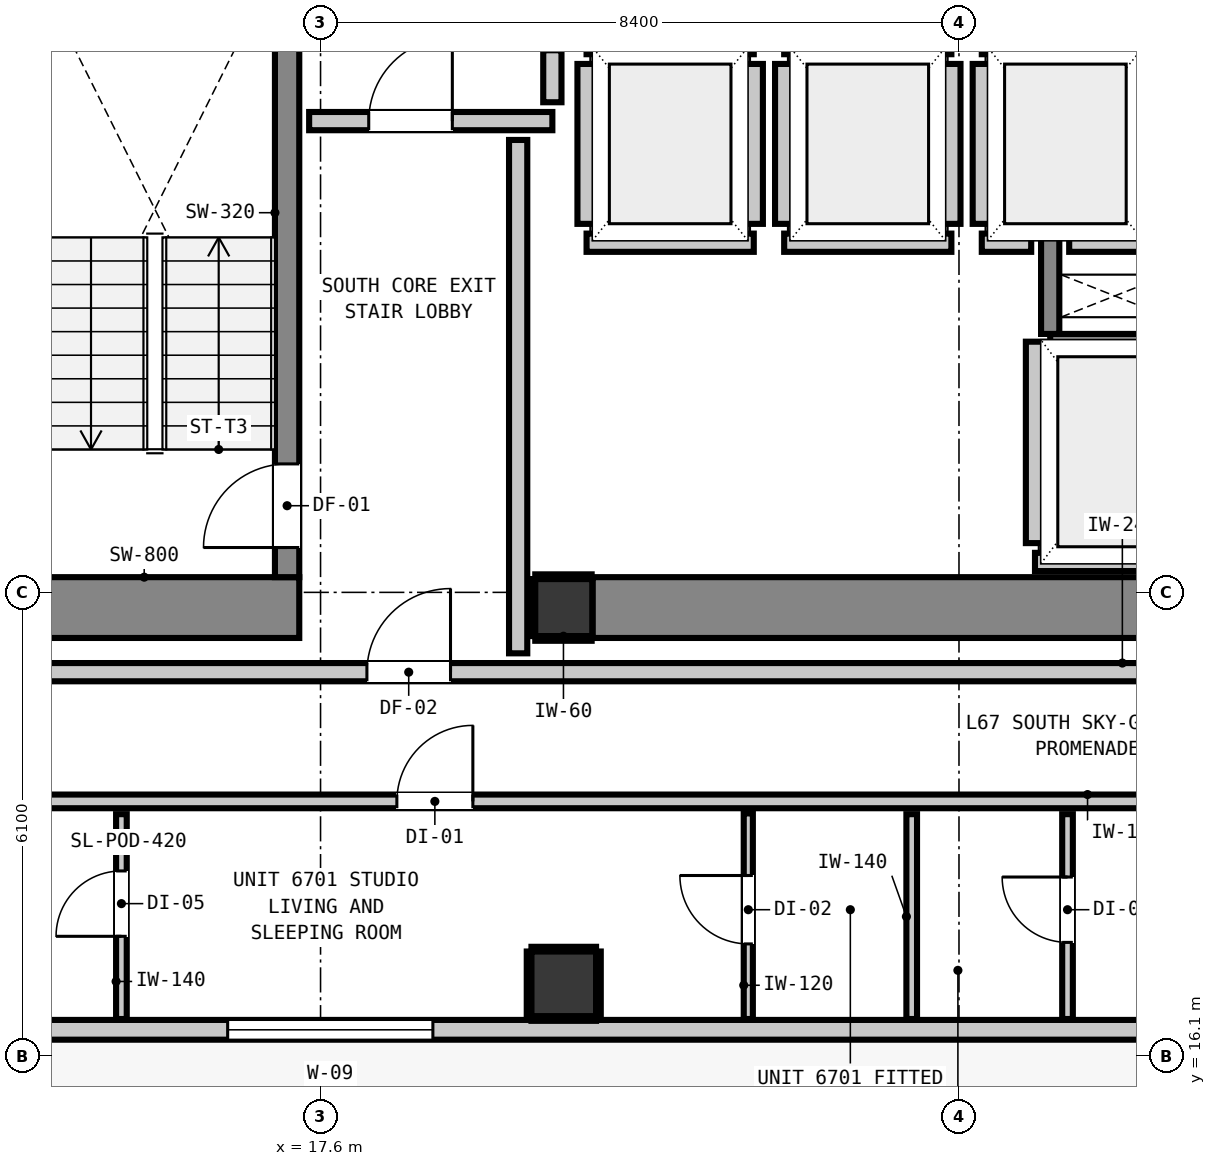
"""IFC4 building model, lengths in metres.
Left out: names, types, materials, properties, quantities, classifications, styles, units other than length and angle.
Written with IfcOpenShell. Run it as: python <this file> out.ifc"""

import sys

from ifc_helpers import new_model, si_unit, direction, frame, frame_2d, origin, origin_2d, place, context, subcontext, project, spatial, rectangle, extrude, element, fill, save


model = new_model("IFC4")
c1 = context("Model", 3, precision=1e-05, world=origin(), true_north=direction((0.0, 1.0)))
c2 = subcontext(c1, "Body", "Model", "MODEL_VIEW")
j1 = project(units=[si_unit("LENGTHUNIT", "METRE"), si_unit("PLANEANGLEUNIT", "RADIAN")], contexts=[c1])
p1 = place(None, origin())
s1 = spatial("IfcSite", under=j1, at=p1, CompositionType="ELEMENT")
p2 = place(p1, origin())
s2 = spatial("IfcBuilding", under=s1, at=p2, CompositionType="ELEMENT")
p3 = place(p2, frame((0.0, 0.0, 231.28)))
s3 = spatial("IfcBuildingStorey", under=s2, at=p3, CompositionType="ELEMENT", Elevation=231.28)
p4 = place(p3, frame((20.8, 22.0, 0.0), z_axis=(0.0, 0.0, 1.0), x_axis=(1.0, 0.0, 0.0)))
e1 = element("IfcColumn", 1, at=p4, inside=s3, PredefinedType="COLUMN", context=c2, shape_type="SweptSolid", body=[
    extrude(rectangle(XDim=0.75, YDim=0.75, at=origin_2d()), origin(), (0.0, 0.0, 1.0), 3.32),
])
p5 = place(p3, frame((13.24, 22.0, 0.0), z_axis=(0.0, 0.0, 1.0), x_axis=(1.0, 0.0, 0.0)))
e2 = element("IfcWall", 2, at=p5, inside=s3, PredefinedType="SHEAR", context=c2, shape_type="SweptSolid", body=[
    extrude(rectangle(XDim=4.08, YDim=0.8, at=frame_2d((2.04, 0.0))), origin(), (0.0, 0.0, 1.0), 3.32),
])
p6 = place(p3, frame((21.18, 22.0, 0.0), z_axis=(0.0, 0.0, 1.0), x_axis=(1.0, 0.0, 0.0)))
e3 = element("IfcWall", 3, at=p6, inside=s3, PredefinedType="SHEAR", context=c2, shape_type="SweptSolid", body=[
    extrude(rectangle(XDim=7.64, YDim=0.8, at=frame_2d((3.82, 0.0))), origin(), (0.0, 0.0, 1.0), 3.32),
])
p7 = place(p3, frame((17.16, 22.4, 0.0), z_axis=(0.0, 0.0, 1.0), x_axis=(0.0, 1.0, 0.0)))
e4 = element("IfcWall", 4, at=p7, inside=s3, PredefinedType="SHEAR", context=c2, shape_type="SweptSolid", body=[
    extrude(rectangle(XDim=8.0, YDim=0.32, at=frame_2d((4.0, 0.0))), origin(), (0.0, 0.0, 1.0), 3.32),
])
p8 = place(p7, frame((0.39, 0.0, 0.0)))
e5 = element("IfcOpeningElement", 5, at=p8, cuts=e4, PredefinedType="OPENING", context=c2, shape_type="SweptSolid", body=[
    extrude(rectangle(XDim=1.1, YDim=2.15, at=frame_2d((0.55, 1.075))), frame((0.0, 0.17, 0.0), z_axis=(0.0, -1.0, 0.0), x_axis=(1.0, 0.0, 0.0)), (0.0, 0.0, 1.0), 0.34),
])
for number, where, z_axis, x_axis in (
    (6, (27.2, 25.48, 0.0), (0.0, 0.0, 1.0), (1.0, 0.0, 0.0)),
    (7, (27.2, 27.08, 0.0), (0.0, 0.0, 1.0), (1.0, 0.0, 0.0)),
):
    element("IfcWall", number, at=place(p3, frame(where, z_axis=z_axis, x_axis=x_axis)), inside=s3, PredefinedType="SHEAR", context=c2, shape_type="SweptSolid", body=[
        extrude(rectangle(XDim=1.7, YDim=0.24, at=frame_2d((0.85, 0.0))), origin(), (0.0, 0.0, 1.0), 3.32),
    ])
p9 = place(p3, frame((27.2, 25.6, 0.0), z_axis=(0.0, 0.0, 1.0), x_axis=(0.0, 1.0, 0.0)))
e8 = element("IfcWall", 8, at=p9, inside=s3, PredefinedType="SHEAR", context=c2, shape_type="SweptSolid", body=[
    extrude(rectangle(XDim=1.36, YDim=0.24, at=frame_2d((0.68, 0.0))), origin(), (0.0, 0.0, 1.0), 3.32),
])
p10 = place(p3, frame((20.8, 17.05, -0.2), z_axis=(0.0, 0.0, 1.0), x_axis=(1.0, 0.0, 0.0)))
e9 = element("IfcColumn", 9, at=p10, inside=s3, PredefinedType="COLUMN", context=c2, shape_type="SweptSolid", body=[
    extrude(rectangle(XDim=0.85, YDim=0.85, at=origin_2d()), origin(), (0.0, 0.0, 1.0), 3.52),
])
p11 = place(p3, frame((45.455, 16.445, 0.0), z_axis=(0.0, 0.0, 1.0), x_axis=(-1.0, 0.0, 0.0)))
e10 = element("IfcWall", 10, at=p11, inside=s3, PredefinedType="STANDARD", context=c2, shape_type="SweptSolid", body=[
    extrude(rectangle(XDim=32.71, YDim=0.26, at=frame_2d((16.355, 0.0))), origin(), (0.0, 0.0, 1.0), 3.1),
])
p12 = place(p11, frame((0.857, 0.0, 0.0)))
e11 = element("IfcOpeningElement", 11, at=p12, cuts=e10, PredefinedType="OPENING", context=c2, shape_type="SweptSolid", body=[
    extrude(rectangle(XDim=1.1, YDim=2.15, at=frame_2d((0.55, 1.075))), frame((0.0, 0.14, 0.0), z_axis=(0.0, -1.0, 0.0), x_axis=(1.0, 0.0, 0.0)), (0.0, 0.0, 1.0), 0.28),
])
p13 = place(p11, frame((26.377, 0.0, 0.85)))
e12 = element("IfcOpeningElement", 12, at=p13, cuts=e10, PredefinedType="OPENING", context=c2, shape_type="SweptSolid", body=[
    extrude(rectangle(XDim=2.7, YDim=2.0, at=frame_2d((1.35, 1.0))), frame((0.0, 0.14, 0.0), z_axis=(0.0, -1.0, 0.0), x_axis=(1.0, 0.0, 0.0)), (0.0, 0.0, 1.0), 0.28),
])
p14 = place(p11, frame((11.255, 0.0, 0.85)))
e13 = element("IfcOpeningElement", 13, at=p14, cuts=e10, PredefinedType="OPENING", context=c2, shape_type="SweptSolid", body=[
    extrude(rectangle(XDim=2.7, YDim=2.0, at=frame_2d((1.35, 1.0))), frame((0.0, 0.14, 0.0), z_axis=(0.0, -1.0, 0.0), x_axis=(1.0, 0.0, 0.0)), (0.0, 0.0, 1.0), 0.28),
])
for number, where, z_axis, x_axis in (
    (14, (21.1, 26.8, 0.0), (0.0, 0.0, 1.0), (1.0, 0.0, 0.0)),
    (15, (21.1, 29.4, 0.0), (0.0, 0.0, 1.0), (1.0, 0.0, 0.0)),
):
    element("IfcWall", number, at=place(p3, frame(where, z_axis=z_axis, x_axis=x_axis)), inside=s3, PredefinedType="PARTITIONING", context=c2, shape_type="SweptSolid", body=[
        extrude(rectangle(XDim=2.2, YDim=0.24, at=frame_2d((1.1, 0.0))), origin(), (0.0, 0.0, 1.0), 3.1),
    ])
p15 = place(p3, frame((21.1, 27.048, 0.0), z_axis=(0.0, 0.0, 1.0), x_axis=(0.0, 1.0, 0.0)))
e16 = element("IfcWall", 16, at=p15, inside=s3, PredefinedType="PARTITIONING", context=c2, shape_type="SweptSolid", body=[
    extrude(rectangle(XDim=2.104, YDim=0.24, at=frame_2d((1.052, 0.0))), origin(), (0.0, 0.0, 1.0), 2.335),
])
p16 = place(p3, frame((23.3, 27.048, 0.0), z_axis=(0.0, 0.0, 1.0), x_axis=(0.0, 1.0, 0.0)))
e17 = element("IfcWall", 17, at=p16, inside=s3, PredefinedType="PARTITIONING", context=c2, shape_type="SweptSolid", body=[
    extrude(rectangle(XDim=2.104, YDim=0.24, at=frame_2d((1.052, 0.0))), origin(), (0.0, 0.0, 1.0), 3.1),
])
for number, where, z_axis, x_axis in (
    (18, (23.7, 26.8, 0.0), (0.0, 0.0, 1.0), (1.0, 0.0, 0.0)),
    (19, (23.7, 29.4, 0.0), (0.0, 0.0, 1.0), (1.0, 0.0, 0.0)),
):
    element("IfcWall", number, at=place(p3, frame(where, z_axis=z_axis, x_axis=x_axis)), inside=s3, PredefinedType="PARTITIONING", context=c2, shape_type="SweptSolid", body=[
        extrude(rectangle(XDim=2.2, YDim=0.24, at=frame_2d((1.1, 0.0))), origin(), (0.0, 0.0, 1.0), 3.1),
    ])
for number, where, z_axis, x_axis in (
    (20, (23.7, 27.048, 0.0), (0.0, 0.0, 1.0), (0.0, 1.0, 0.0)),
    (21, (25.9, 27.048, 0.0), (0.0, 0.0, 1.0), (0.0, 1.0, 0.0)),
):
    element("IfcWall", number, at=place(p3, frame(where, z_axis=z_axis, x_axis=x_axis)), inside=s3, PredefinedType="PARTITIONING", context=c2, shape_type="SweptSolid", body=[
        extrude(rectangle(XDim=2.104, YDim=0.24, at=frame_2d((1.052, 0.0))), origin(), (0.0, 0.0, 1.0), 3.1),
    ])
p17 = place(p3, frame((26.3, 26.8, 0.0), z_axis=(0.0, 0.0, 1.0), x_axis=(1.0, 0.0, 0.0)))
e22 = element("IfcWall", 22, at=p17, inside=s3, PredefinedType="PARTITIONING", context=c2, shape_type="SweptSolid", body=[
    extrude(rectangle(XDim=0.65, YDim=0.24, at=frame_2d((0.325, 0.0))), origin(), (0.0, 0.0, 1.0), 3.1),
])
p18 = place(p3, frame((27.45, 26.8, 0.0), z_axis=(0.0, 0.0, 1.0), x_axis=(1.0, 0.0, 0.0)))
e23 = element("IfcWall", 23, at=p18, inside=s3, PredefinedType="PARTITIONING", context=c2, shape_type="SweptSolid", body=[
    extrude(rectangle(XDim=1.05, YDim=0.24, at=frame_2d((0.525, 0.0))), origin(), (0.0, 0.0, 1.0), 3.1),
])
p19 = place(p3, frame((26.3, 29.4, 0.0), z_axis=(0.0, 0.0, 1.0), x_axis=(1.0, 0.0, 0.0)))
e24 = element("IfcWall", 24, at=p19, inside=s3, PredefinedType="PARTITIONING", context=c2, shape_type="SweptSolid", body=[
    extrude(rectangle(XDim=2.2, YDim=0.24, at=frame_2d((1.1, 0.0))), origin(), (0.0, 0.0, 1.0), 3.1),
])
p20 = place(p3, frame((26.3, 27.048, 0.0), z_axis=(0.0, 0.0, 1.0), x_axis=(0.0, 1.0, 0.0)))
e25 = element("IfcWall", 25, at=p20, inside=s3, PredefinedType="PARTITIONING", context=c2, shape_type="SweptSolid", body=[
    extrude(rectangle(XDim=2.104, YDim=0.24, at=frame_2d((1.052, 0.0))), origin(), (0.0, 0.0, 1.0), 3.1),
])
p21 = place(p3, frame((27.0, 22.6, 0.0), z_axis=(0.0, 0.0, 1.0), x_axis=(1.0, 0.0, 0.0)))
e26 = element("IfcWall", 26, at=p21, inside=s3, PredefinedType="PARTITIONING", context=c2, shape_type="SweptSolid", body=[
    extrude(rectangle(XDim=2.372, YDim=0.24, at=frame_2d((1.186, 0.0))), origin(), (0.0, 0.0, 1.0), 3.1),
])
p22 = place(p3, frame((27.0, 22.848, 0.0), z_axis=(0.0, 0.0, 1.0), x_axis=(0.0, 1.0, 0.0)))
e27 = element("IfcWall", 27, at=p22, inside=s3, PredefinedType="PARTITIONING", context=c2, shape_type="SweptSolid", body=[
    extrude(rectangle(XDim=2.65, YDim=0.24, at=frame_2d((1.325, 0.0))), origin(), (0.0, 0.0, 1.0), 3.1),
])
p23 = place(p3, frame((10.787, 21.15, 0.0), z_axis=(0.0, 0.0, 1.0), x_axis=(1.0, 0.0, 0.0)))
e28 = element("IfcWall", 28, at=p23, inside=s3, PredefinedType="PARTITIONING", context=c2, shape_type="SweptSolid", body=[
    extrude(rectangle(XDim=26.102, YDim=0.24, at=frame_2d((13.051, 0.0))), origin(), (0.0, 0.0, 1.0), 3.1),
])
p24 = place(p23, frame((7.423, 0.0, 0.0)))
e29 = element("IfcOpeningElement", 29, at=p24, cuts=e28, PredefinedType="OPENING", context=c2, shape_type="SweptSolid", body=[
    extrude(rectangle(XDim=1.1, YDim=2.15, at=frame_2d((0.55, 1.075))), frame((0.0, 0.13, 0.0), z_axis=(0.0, -1.0, 0.0), x_axis=(1.0, 0.0, 0.0)), (0.0, 0.0, 1.0), 0.26),
])
p25 = place(p3, frame((17.45, 28.4, 0.0), z_axis=(0.0, 0.0, 1.0), x_axis=(1.0, 0.0, 0.0)))
e30 = element("IfcWall", 30, at=p25, inside=s3, PredefinedType="PARTITIONING", context=c2, shape_type="SweptSolid", body=[
    extrude(rectangle(XDim=3.2, YDim=0.24, at=frame_2d((1.6, 0.0))), origin(), (0.0, 0.0, 1.0), 3.1),
])
p26 = place(p25, frame((0.784, 0.0, 0.0)))
e31 = element("IfcOpeningElement", 31, at=p26, cuts=e30, PredefinedType="OPENING", context=c2, shape_type="SweptSolid", body=[
    extrude(rectangle(XDim=1.1, YDim=2.15, at=frame_2d((0.55, 1.075))), frame((0.0, 0.13, 0.0), z_axis=(0.0, -1.0, 0.0), x_axis=(1.0, 0.0, 0.0)), (0.0, 0.0, 1.0), 0.26),
])
p27 = place(p3, frame((10.787, 19.45, 0.0), z_axis=(0.0, 0.0, 1.0), x_axis=(1.0, 0.0, 0.0)))
e32 = element("IfcWall", 32, at=p27, inside=s3, PredefinedType="PARTITIONING", context=c2, shape_type="SweptSolid", body=[
    extrude(rectangle(XDim=26.102, YDim=0.18, at=frame_2d((13.051, 0.0))), origin(), (0.0, 0.0, 1.0), 3.1),
])
p28 = place(p27, frame((7.817, 0.0, 0.0)))
e33 = element("IfcOpeningElement", 33, at=p28, cuts=e32, PredefinedType="OPENING", context=c2, shape_type="SweptSolid", body=[
    extrude(rectangle(XDim=1.0, YDim=2.15, at=frame_2d((0.5, 1.075))), frame((0.0, 0.1, 0.0), z_axis=(0.0, -1.0, 0.0), x_axis=(1.0, 0.0, 0.0)), (0.0, 0.0, 1.0), 0.2),
])
p29 = place(p27, frame((24.992, 0.0, 0.0)))
e34 = element("IfcOpeningElement", 34, at=p29, cuts=e32, PredefinedType="OPENING", context=c2, shape_type="SweptSolid", body=[
    extrude(rectangle(XDim=1.0, YDim=2.15, at=frame_2d((0.5, 1.075))), frame((0.0, 0.1, 0.0), z_axis=(0.0, -1.0, 0.0), x_axis=(1.0, 0.0, 0.0)), (0.0, 0.0, 1.0), 0.2),
])
p30 = place(p3, frame((20.2, 21.398, 0.0), z_axis=(0.0, 0.0, 1.0), x_axis=(0.0, 1.0, 0.0)))
e35 = element("IfcWall", 35, at=p30, inside=s3, PredefinedType="PARTITIONING", context=c2, shape_type="SweptSolid", body=[
    extrude(rectangle(XDim=6.754, YDim=0.24, at=frame_2d((3.377, 0.0))), origin(), (0.0, 0.0, 1.0), 3.1),
])
p31 = place(p3, frame((20.65, 28.648, 0.0), z_axis=(0.0, 0.0, 1.0), x_axis=(0.0, 1.0, 0.0)))
e36 = element("IfcWall", 36, at=p31, inside=s3, PredefinedType="PARTITIONING", context=c2, shape_type="SweptSolid", body=[
    extrude(rectangle(XDim=0.684, YDim=0.24, at=frame_2d((0.342, 0.0))), origin(), (0.0, 0.0, 1.0), 2.335),
])
p32 = place(p3, frame((14.98, 16.587, 0.0), z_axis=(0.0, 0.0, 1.0), x_axis=(0.0, 1.0, 0.0)))
e37 = element("IfcWall", 37, at=p32, inside=s3, PredefinedType="PARTITIONING", context=c2, shape_type="SweptSolid", body=[
    extrude(rectangle(XDim=2.695, YDim=0.14, at=frame_2d((1.348, 0.0))), origin(), (0.0, 0.0, 1.0), 3.1),
])
p33 = place(p32, frame((1.088, 0.0, 0.0)))
e38 = element("IfcOpeningElement", 38, at=p33, cuts=e37, PredefinedType="OPENING", context=c2, shape_type="SweptSolid", body=[
    extrude(rectangle(XDim=0.86, YDim=2.02, at=frame_2d((0.43, 1.01))), frame((0.0, 0.08, 0.0), z_axis=(0.0, -1.0, 0.0), x_axis=(1.0, 0.0, 0.0)), (0.0, 0.0, 1.0), 0.16),
])
p34 = place(p3, frame((25.378, 16.587, 0.0), z_axis=(0.0, 0.0, 1.0), x_axis=(0.0, 1.0, 0.0)))
e39 = element("IfcWall", 39, at=p34, inside=s3, PredefinedType="PARTITIONING", context=c2, shape_type="SweptSolid", body=[
    extrude(rectangle(XDim=2.695, YDim=0.14, at=frame_2d((1.348, 0.0))), origin(), (0.0, 0.0, 1.0), 3.1),
])
p35 = place(p3, frame((27.428, 16.587, 0.0), z_axis=(0.0, 0.0, 1.0), x_axis=(0.0, 1.0, 0.0)))
e40 = element("IfcWall", 40, at=p35, inside=s3, PredefinedType="PARTITIONING", context=c2, shape_type="SweptSolid", body=[
    extrude(rectangle(XDim=2.695, YDim=0.14, at=frame_2d((1.348, 0.0))), origin(), (0.0, 0.0, 1.0), 3.1),
])
p36 = place(p35, frame((1.008, 0.0, 0.0)))
e41 = element("IfcOpeningElement", 41, at=p36, cuts=e40, PredefinedType="OPENING", context=c2, shape_type="SweptSolid", body=[
    extrude(rectangle(XDim=0.86, YDim=2.02, at=frame_2d((0.43, 1.01))), frame((0.0, 0.08, 0.0), z_axis=(0.0, -1.0, 0.0), x_axis=(1.0, 0.0, 0.0)), (0.0, 0.0, 1.0), 0.16),
])
p37 = place(p3, frame((23.228, 16.587, 0.0), z_axis=(0.0, 0.0, 1.0), x_axis=(0.0, 1.0, 0.0)))
e42 = element("IfcWall", 42, at=p37, inside=s3, PredefinedType="PARTITIONING", context=c2, shape_type="SweptSolid", body=[
    extrude(rectangle(XDim=2.705, YDim=0.12, at=frame_2d((1.353, 0.0))), origin(), (0.0, 0.0, 1.0), 3.1),
])
p38 = place(p37, frame((0.988, 0.0, 0.0)))
e43 = element("IfcOpeningElement", 43, at=p38, cuts=e42, PredefinedType="OPENING", context=c2, shape_type="SweptSolid", body=[
    extrude(rectangle(XDim=0.9, YDim=2.1, at=frame_2d((0.45, 1.05))), frame((0.0, 0.07, 0.0), z_axis=(0.0, -1.0, 0.0), x_axis=(1.0, 0.0, 0.0)), (0.0, 0.0, 1.0), 0.14),
])
for number, where, z_axis, x_axis in (
    (44, (20.425, 21.593, 0.0), (0.0, 0.0, 1.0), (1.0, 0.0, 0.0)),
    (45, (20.425, 22.407, 0.0), (0.0, 0.0, 1.0), (1.0, 0.0, 0.0)),
):
    element("IfcWall", number, at=place(p3, frame(where, z_axis=z_axis, x_axis=x_axis)), inside=s3, PredefinedType="PARTITIONING", context=c2, shape_type="SweptSolid", body=[
        extrude(rectangle(XDim=0.742, YDim=0.06, at=frame_2d((0.371, 0.0))), origin(), (0.0, 0.0, 1.0), 1.45),
    ])
p39 = place(p3, frame((20.393, 21.625, 0.0), z_axis=(0.0, 0.0, 1.0), x_axis=(0.0, 1.0, 0.0)))
e46 = element("IfcWall", 46, at=p39, inside=s3, PredefinedType="PARTITIONING", context=c2, shape_type="SweptSolid", body=[
    extrude(rectangle(XDim=0.75, YDim=0.06, at=frame_2d((0.375, 0.0))), origin(), (0.0, 0.0, 1.0), 1.45),
])
for number, where, z_axis, x_axis in (
    (47, (20.375, 16.593, 0.0), (0.0, 0.0, 1.0), (1.0, 0.0, 0.0)),
    (48, (20.375, 17.507, 0.0), (0.0, 0.0, 1.0), (1.0, 0.0, 0.0)),
    (49, (20.343, 16.625, 0.0), (0.0, 0.0, 1.0), (0.0, 1.0, 0.0)),
    (50, (21.257, 16.625, 0.0), (0.0, 0.0, 1.0), (0.0, 1.0, 0.0)),
):
    element("IfcWall", number, at=place(p3, frame(where, z_axis=z_axis, x_axis=x_axis)), inside=s3, PredefinedType="PARTITIONING", context=c2, shape_type="SweptSolid", body=[
        extrude(rectangle(XDim=0.85, YDim=0.06, at=frame_2d((0.425, 0.0))), origin(), (0.0, 0.0, 1.0), 1.45),
    ])
p40 = place(p13, origin())
e51 = element("IfcWindow", 51, at=p40, inside=s3, PartitioningType="SINGLE_PANEL", PredefinedType="WINDOW", context=c2, shape_type="SweptSolid", body=[
    extrude(rectangle(XDim=2.7, YDim=2.0, at=frame_2d((1.35, 1.0))), frame((0.0, 0.03, 0.0), z_axis=(0.0, -1.0, 0.0), x_axis=(1.0, 0.0, 0.0)), (0.0, 0.0, 1.0), 0.06),
])
fill(e12, e51)
p41 = place(p8, origin())
e52 = element("IfcDoor", 52, at=p41, inside=s3, OperationType="SINGLE_SWING_LEFT", PredefinedType="DOOR", context=c2, shape_type="SweptSolid", body=[
    extrude(rectangle(XDim=1.1, YDim=2.15, at=frame_2d((0.55, 1.075))), frame((0.0, 0.025, 0.0), z_axis=(0.0, -1.0, 0.0), x_axis=(1.0, 0.0, 0.0)), (0.0, 0.0, 1.0), 0.05),
])
fill(e5, e52)
p42 = place(p26, origin())
e53 = element("IfcDoor", 53, at=p42, inside=s3, OperationType="SINGLE_SWING_RIGHT", PredefinedType="DOOR", context=c2, shape_type="SweptSolid", body=[
    extrude(rectangle(XDim=1.1, YDim=2.15, at=frame_2d((0.55, 1.075))), frame((0.0, 0.025, 0.0), z_axis=(0.0, -1.0, 0.0), x_axis=(1.0, 0.0, 0.0)), (0.0, 0.0, 1.0), 0.05),
])
fill(e31, e53)
p43 = place(p24, origin())
e54 = element("IfcDoor", 54, at=p43, inside=s3, OperationType="SINGLE_SWING_RIGHT", PredefinedType="DOOR", context=c2, shape_type="SweptSolid", body=[
    extrude(rectangle(XDim=1.1, YDim=2.15, at=frame_2d((0.55, 1.075))), frame((0.0, 0.025, 0.0), z_axis=(0.0, -1.0, 0.0), x_axis=(1.0, 0.0, 0.0)), (0.0, 0.0, 1.0), 0.05),
])
fill(e29, e54)
p44 = place(p28, origin())
e55 = element("IfcDoor", 55, at=p44, inside=s3, OperationType="SINGLE_SWING_RIGHT", PredefinedType="DOOR", context=c2, shape_type="SweptSolid", body=[
    extrude(rectangle(XDim=1.0, YDim=2.15, at=frame_2d((0.5, 1.075))), frame((0.0, 0.025, 0.0), z_axis=(0.0, -1.0, 0.0), x_axis=(1.0, 0.0, 0.0)), (0.0, 0.0, 1.0), 0.05),
])
fill(e33, e55)
p45 = place(p33, origin())
e56 = element("IfcDoor", 56, at=p45, inside=s3, OperationType="SINGLE_SWING_LEFT", PredefinedType="DOOR", context=c2, shape_type="SweptSolid", body=[
    extrude(rectangle(XDim=0.86, YDim=2.02, at=frame_2d((0.43, 1.01))), frame((0.0, 0.025, 0.0), z_axis=(0.0, -1.0, 0.0), x_axis=(1.0, 0.0, 0.0)), (0.0, 0.0, 1.0), 0.05),
])
fill(e38, e56)
p46 = place(p38, origin())
e57 = element("IfcDoor", 57, at=p46, inside=s3, OperationType="SINGLE_SWING_RIGHT", PredefinedType="DOOR", context=c2, shape_type="SweptSolid", body=[
    extrude(rectangle(XDim=0.9, YDim=2.1, at=frame_2d((0.45, 1.05))), frame((0.0, 0.025, 0.0), z_axis=(0.0, -1.0, 0.0), x_axis=(1.0, 0.0, 0.0)), (0.0, 0.0, 1.0), 0.05),
])
fill(e43, e57)
p47 = place(p36, origin())
e58 = element("IfcDoor", 58, at=p47, inside=s3, OperationType="SINGLE_SWING_RIGHT", PredefinedType="DOOR", context=c2, shape_type="SweptSolid", body=[
    extrude(rectangle(XDim=0.86, YDim=2.02, at=frame_2d((0.43, 1.01))), frame((0.0, 0.025, 0.0), z_axis=(0.0, -1.0, 0.0), x_axis=(1.0, 0.0, 0.0)), (0.0, 0.0, 1.0), 0.05),
])
fill(e41, e58)
save(model, sys.argv[1])
